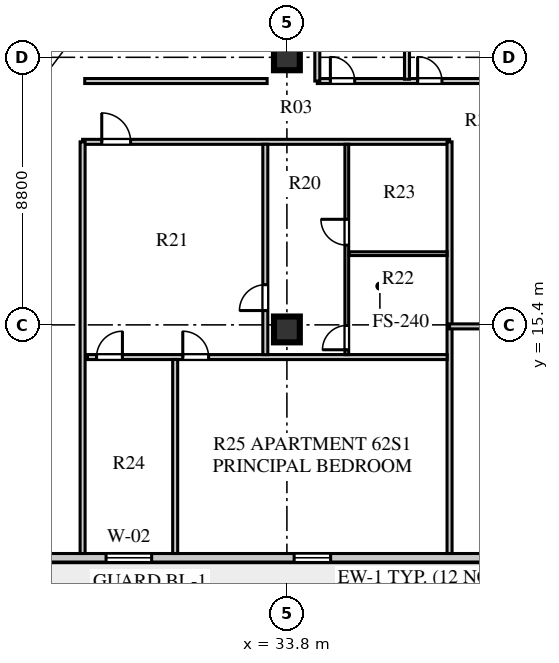
"""IFC4 building model, lengths in metres.
Left out: names, types, materials, properties, quantities, classifications, styles, units other than length and angle.
Written with IfcOpenShell. Run it as: python <this file> out.ifc"""

import sys

from ifc_helpers import new_model, si_unit, direction, frame, frame_2d, origin, origin_2d, place, context, subcontext, project, spatial, rectangle, extrude, element, fill, save


model = new_model("IFC4")
c1 = context("Model", 3, precision=1e-05, world=origin(), true_north=direction((0.0, 1.0)))
c2 = subcontext(c1, "Body", "Model", "MODEL_VIEW")
j1 = project(units=[si_unit("LENGTHUNIT", "METRE"), si_unit("PLANEANGLEUNIT", "RADIAN")], contexts=[c1])
p1 = place(None, origin())
s1 = spatial("IfcSite", under=j1, at=p1, CompositionType="ELEMENT")
p2 = place(p1, origin())
s2 = spatial("IfcBuilding", under=s1, at=p2, CompositionType="ELEMENT")
p3 = place(p2, frame((0.0, 0.0, 253.1)))
s3 = spatial("IfcBuildingStorey", under=s2, at=p3, CompositionType="ELEMENT", Elevation=253.1)
for number, where, z_axis, x_axis in (
    (1, (33.8, 15.25, 0.0), (0.0, 0.0, 1.0), (1.0, 0.0, 0.0)),
    (2, (33.8, 24.2, 0.0), (0.0, 0.0, 1.0), (1.0, 0.0, 0.0)),
):
    element("IfcColumn", number, at=place(p3, frame(where, z_axis=z_axis, x_axis=x_axis)), inside=s3, PredefinedType="COLUMN", context=c2, shape_type="SweptSolid", body=[
        extrude(rectangle(XDim=0.85, YDim=0.85, at=origin_2d()), origin(), (0.0, 0.0, 1.0), 3.66),
    ])
p4 = place(p3, frame((13.05, 7.74, 0.0), z_axis=(0.0, 0.0, 1.0), x_axis=(1.0, 0.0, 0.0)))
e3 = element("IfcWall", 3, at=p4, inside=s3, PredefinedType="STANDARD", context=c2, shape_type="SweptSolid", body=[
    extrude(rectangle(XDim=32.5, YDim=0.28, at=frame_2d((16.25, 0.0))), origin(), (0.0, 0.0, 1.0), 3.66),
])
p5 = place(p4, frame((0.95, 0.0, 0.0)))
e4 = element("IfcOpeningElement", 4, at=p5, cuts=e3, PredefinedType="OPENING", context=c2, shape_type="SweptSolid", body=[
    extrude(rectangle(XDim=1.0, YDim=2.05, at=frame_2d((0.5, 1.025))), frame((0.0, 0.15, 0.0), z_axis=(0.0, -1.0, 0.0), x_axis=(1.0, 0.0, 0.0)), (0.0, 0.0, 1.0), 0.3),
])
p6 = place(p4, frame((2.935, 0.0, 0.8)))
e5 = element("IfcOpeningElement", 5, at=p6, cuts=e3, PredefinedType="OPENING", context=c2, shape_type="SweptSolid", body=[
    extrude(rectangle(XDim=2.25, YDim=2.0, at=frame_2d((1.125, 1.0))), frame((0.0, 0.15, 0.0), z_axis=(0.0, -1.0, 0.0), x_axis=(1.0, 0.0, 0.0)), (0.0, 0.0, 1.0), 0.3),
])
p7 = place(p4, frame((8.295, 0.0, 0.8)))
e6 = element("IfcOpeningElement", 6, at=p7, cuts=e3, PredefinedType="OPENING", context=c2, shape_type="SweptSolid", body=[
    extrude(rectangle(XDim=1.8, YDim=2.0, at=frame_2d((0.9, 1.0))), frame((0.0, 0.15, 0.0), z_axis=(0.0, -1.0, 0.0), x_axis=(1.0, 0.0, 0.0)), (0.0, 0.0, 1.0), 0.3),
])
p8 = place(p4, frame((14.802, 0.0, 0.8)))
e7 = element("IfcOpeningElement", 7, at=p8, cuts=e3, PredefinedType="OPENING", context=c2, shape_type="SweptSolid", body=[
    extrude(rectangle(XDim=1.5, YDim=2.0, at=frame_2d((0.75, 1.0))), frame((0.0, 0.15, 0.0), z_axis=(0.0, -1.0, 0.0), x_axis=(1.0, 0.0, 0.0)), (0.0, 0.0, 1.0), 0.3),
])
p9 = place(p4, frame((20.988, 0.0, 0.8)))
e8 = element("IfcOpeningElement", 8, at=p9, cuts=e3, PredefinedType="OPENING", context=c2, shape_type="SweptSolid", body=[
    extrude(rectangle(XDim=1.2, YDim=1.75, at=frame_2d((0.6, 0.875))), frame((0.0, 0.15, 0.0), z_axis=(0.0, -1.0, 0.0), x_axis=(1.0, 0.0, 0.0)), (0.0, 0.0, 1.0), 0.3),
])
p10 = place(p4, frame((28.045, 0.0, 0.8)))
e9 = element("IfcOpeningElement", 9, at=p10, cuts=e3, PredefinedType="OPENING", context=c2, shape_type="SweptSolid", body=[
    extrude(rectangle(XDim=2.4, YDim=2.05, at=frame_2d((1.2, 1.025))), frame((0.0, 0.15, 0.0), z_axis=(0.0, -1.0, 0.0), x_axis=(1.0, 0.0, 0.0)), (0.0, 0.0, 1.0), 0.3),
])
p11 = place(p3, frame((27.08, 21.42, 0.0), z_axis=(0.0, 0.0, 1.0), x_axis=(1.0, 0.0, 0.0)))
e10 = element("IfcWall", 10, at=p11, inside=s3, PredefinedType="PARTITIONING", context=c2, shape_type="SweptSolid", body=[
    extrude(rectangle(XDim=12.07, YDim=0.165, at=frame_2d((6.035, 0.0))), origin(), (0.0, 0.0, 1.0), 3.31),
])
p12 = place(p11, frame((0.63, 0.0, 0.0)))
e11 = element("IfcOpeningElement", 11, at=p12, cuts=e10, PredefinedType="OPENING", context=c2, shape_type="SweptSolid", body=[
    extrude(rectangle(XDim=0.95, YDim=2.1, at=frame_2d((0.475, 1.05))), frame((0.0, 0.093, 0.0), z_axis=(0.0, -1.0, 0.0), x_axis=(1.0, 0.0, 0.0)), (0.0, 0.0, 1.0), 0.185),
])
p13 = place(p3, frame((27.08, 7.88, 0.0), z_axis=(0.0, 0.0, 1.0), x_axis=(0.0, 1.0, 0.0)))
e12 = element("IfcWall", 12, at=p13, inside=s3, PredefinedType="PARTITIONING", context=c2, shape_type="SweptSolid", body=[
    extrude(rectangle(XDim=13.54, YDim=0.165, at=frame_2d((6.77, 0.0))), origin(), (0.0, 0.0, 1.0), 3.66),
])
p14 = place(p3, frame((27.15, 23.42, 0.0), z_axis=(0.0, 0.0, 1.0), x_axis=(1.0, 0.0, 0.0)))
e13 = element("IfcWall", 13, at=p14, inside=s3, PredefinedType="PARTITIONING", context=c2, shape_type="SweptSolid", body=[
    extrude(rectangle(XDim=6.0, YDim=0.165, at=frame_2d((3.0, 0.0))), origin(), (0.0, 0.0, 1.0), 3.66),
])
p15 = place(p3, frame((39.15, 7.88, 0.0), z_axis=(0.0, 0.0, 1.0), x_axis=(0.0, 1.0, 0.0)))
e14 = element("IfcWall", 14, at=p15, inside=s3, PredefinedType="PARTITIONING", context=c2, shape_type="SweptSolid", body=[
    extrude(rectangle(XDim=13.54, YDim=0.165, at=frame_2d((6.77, 0.0))), origin(), (0.0, 0.0, 1.0), 3.66),
])
p16 = place(p3, frame((27.24, 14.341, 0.0), z_axis=(0.0, 0.0, 1.0), x_axis=(1.0, 0.0, 0.0)))
e15 = element("IfcWall", 15, at=p16, inside=s3, PredefinedType="PARTITIONING", context=c2, shape_type="SweptSolid", body=[
    extrude(rectangle(XDim=11.83, YDim=0.165, at=frame_2d((5.915, 0.0))), origin(), (0.0, 0.0, 1.0), 3.66),
])
p17 = place(p16, frame((0.3, 0.0, 0.0)))
e16 = element("IfcOpeningElement", 16, at=p17, cuts=e15, PredefinedType="OPENING", context=c2, shape_type="SweptSolid", body=[
    extrude(rectangle(XDim=0.85, YDim=2.08, at=frame_2d((0.425, 1.04))), frame((0.0, 0.093, 0.0), z_axis=(0.0, -1.0, 0.0), x_axis=(1.0, 0.0, 0.0)), (0.0, 0.0, 1.0), 0.185),
])
p18 = place(p16, frame((3.135, 0.0, 0.0)))
e17 = element("IfcOpeningElement", 17, at=p18, cuts=e15, PredefinedType="OPENING", context=c2, shape_type="SweptSolid", body=[
    extrude(rectangle(XDim=0.85, YDim=2.08, at=frame_2d((0.425, 1.04))), frame((0.0, 0.093, 0.0), z_axis=(0.0, -1.0, 0.0), x_axis=(1.0, 0.0, 0.0)), (0.0, 0.0, 1.0), 0.185),
])
p19 = place(p3, frame((35.77, 14.421, 0.0), z_axis=(0.0, 0.0, 1.0), x_axis=(0.0, 1.0, 0.0)))
e18 = element("IfcWall", 18, at=p19, inside=s3, PredefinedType="PLUMBINGWALL", context=c2, shape_type="SweptSolid", body=[
    extrude(rectangle(XDim=6.919, YDim=0.125, at=frame_2d((3.459, 0.0))), origin(), (0.0, 0.0, 1.0), 3.66),
])
p20 = place(p19, frame((0.16, 0.0, 0.0)))
e19 = element("IfcOpeningElement", 19, at=p20, cuts=e18, PredefinedType="OPENING", context=c2, shape_type="SweptSolid", body=[
    extrude(rectangle(XDim=0.8, YDim=2.05, at=frame_2d((0.4, 1.025))), frame((0.0, 0.073, 0.0), z_axis=(0.0, -1.0, 0.0), x_axis=(1.0, 0.0, 0.0)), (0.0, 0.0, 1.0), 0.145),
])
p21 = place(p19, frame((3.601, 0.0, 0.0)))
e20 = element("IfcOpeningElement", 20, at=p21, cuts=e18, PredefinedType="OPENING", context=c2, shape_type="SweptSolid", body=[
    extrude(rectangle(XDim=0.85, YDim=2.08, at=frame_2d((0.425, 1.04))), frame((0.0, 0.073, 0.0), z_axis=(0.0, -1.0, 0.0), x_axis=(1.0, 0.0, 0.0)), (0.0, 0.0, 1.0), 0.145),
])
p22 = place(p3, frame((35.85, 17.742, 0.0), z_axis=(0.0, 0.0, 1.0), x_axis=(1.0, 0.0, 0.0)))
e21 = element("IfcWall", 21, at=p22, inside=s3, PredefinedType="PLUMBINGWALL", context=c2, shape_type="SweptSolid", body=[
    extrude(rectangle(XDim=3.22, YDim=0.125, at=frame_2d((1.61, 0.0))), origin(), (0.0, 0.0, 1.0), 3.66),
])
p23 = place(p3, frame((33.09, 14.421, 0.0), z_axis=(0.0, 0.0, 1.0), x_axis=(0.0, 1.0, 0.0)))
e22 = element("IfcWall", 22, at=p23, inside=s3, PredefinedType="PARTITIONING", context=c2, shape_type="SweptSolid", body=[
    extrude(rectangle(XDim=6.919, YDim=0.165, at=frame_2d((3.459, 0.0))), origin(), (0.0, 0.0, 1.0), 3.66),
])
p24 = place(p23, frame((1.45, 0.0, 0.0)))
e23 = element("IfcOpeningElement", 23, at=p24, cuts=e22, PredefinedType="OPENING", context=c2, shape_type="SweptSolid", body=[
    extrude(rectangle(XDim=0.85, YDim=2.08, at=frame_2d((0.425, 1.04))), frame((0.0, 0.093, 0.0), z_axis=(0.0, -1.0, 0.0), x_axis=(1.0, 0.0, 0.0)), (0.0, 0.0, 1.0), 0.185),
])
p25 = place(p3, frame((30.125, 7.88, 0.0), z_axis=(0.0, 0.0, 1.0), x_axis=(0.0, 1.0, 0.0)))
e24 = element("IfcWall", 24, at=p25, inside=s3, PredefinedType="PARTITIONING", context=c2, shape_type="SweptSolid", body=[
    extrude(rectangle(XDim=6.381, YDim=0.165, at=frame_2d((3.19, 0.0))), origin(), (0.0, 0.0, 1.0), 3.66),
])
p26 = place(p3, frame((39.15, 15.35, 0.0), z_axis=(0.0, 0.0, 1.0), x_axis=(1.0, 0.0, 0.0)))
e25 = element("IfcWall", 25, at=p26, inside=s3, PredefinedType="PARTITIONING", context=c2, shape_type="SweptSolid", body=[
    extrude(rectangle(XDim=11.37, YDim=0.165, at=frame_2d((5.685, 0.0))), origin(), (0.0, 0.0, 1.0), 3.06),
])
p27 = place(p3, frame((34.8, 23.42, 0.0), z_axis=(0.0, 0.0, 1.0), x_axis=(1.0, 0.0, 0.0)))
e26 = element("IfcWall", 26, at=p27, inside=s3, PredefinedType="PARTITIONING", context=c2, shape_type="SweptSolid", body=[
    extrude(rectangle(XDim=5.9, YDim=0.165, at=frame_2d((2.95, 0.0))), origin(), (0.0, 0.0, 1.0), 3.66),
])
p28 = place(p27, frame((0.43, 0.0, 0.0)))
e27 = element("IfcOpeningElement", 27, at=p28, cuts=e26, PredefinedType="OPENING", context=c2, shape_type="SweptSolid", body=[
    extrude(rectangle(XDim=0.8, YDim=2.05, at=frame_2d((0.4, 1.025))), frame((0.0, 0.093, 0.0), z_axis=(0.0, -1.0, 0.0), x_axis=(1.0, 0.0, 0.0)), (0.0, 0.0, 1.0), 0.185),
])
p29 = place(p27, frame((3.3, 0.0, 0.0)))
e28 = element("IfcOpeningElement", 28, at=p29, cuts=e26, PredefinedType="OPENING", context=c2, shape_type="SweptSolid", body=[
    extrude(rectangle(XDim=0.8, YDim=2.05, at=frame_2d((0.4, 1.025))), frame((0.0, 0.093, 0.0), z_axis=(0.0, -1.0, 0.0), x_axis=(1.0, 0.0, 0.0)), (0.0, 0.0, 1.0), 0.185),
])
p30 = place(p3, frame((34.8, 23.42, 0.0), z_axis=(0.0, 0.0, 1.0), x_axis=(0.0, 1.0, 0.0)))
e29 = element("IfcWall", 29, at=p30, inside=s3, PredefinedType="PARTITIONING", context=c2, shape_type="SweptSolid", body=[
    extrude(rectangle(XDim=3.78, YDim=0.165, at=frame_2d((1.89, 0.0))), origin(), (0.0, 0.0, 1.0), 3.66),
])
p31 = place(p3, frame((37.75, 23.48, 0.0), z_axis=(0.0, 0.0, 1.0), x_axis=(0.0, 1.0, 0.0)))
e30 = element("IfcWall", 30, at=p31, inside=s3, PredefinedType="PARTITIONING", context=c2, shape_type="SweptSolid", body=[
    extrude(rectangle(XDim=3.66, YDim=0.165, at=frame_2d((1.83, 0.0))), origin(), (0.0, 0.0, 1.0), 3.66),
])
p32 = place(p8, origin())
e31 = element("IfcWindow", 31, at=p32, inside=s3, PartitioningType="SINGLE_PANEL", PredefinedType="WINDOW", context=c2, shape_type="SweptSolid", body=[
    extrude(rectangle(XDim=1.5, YDim=2.0, at=frame_2d((0.75, 1.0))), frame((0.0, 0.03, 0.0), z_axis=(0.0, -1.0, 0.0), x_axis=(1.0, 0.0, 0.0)), (0.0, 0.0, 1.0), 0.06),
])
fill(e7, e31)
p33 = place(p9, origin())
e32 = element("IfcWindow", 32, at=p33, inside=s3, PartitioningType="SINGLE_PANEL", PredefinedType="WINDOW", context=c2, shape_type="SweptSolid", body=[
    extrude(rectangle(XDim=1.2, YDim=1.75, at=frame_2d((0.6, 0.875))), frame((0.0, 0.03, 0.0), z_axis=(0.0, -1.0, 0.0), x_axis=(1.0, 0.0, 0.0)), (0.0, 0.0, 1.0), 0.06),
])
fill(e8, e32)
p34 = place(p24, origin())
e33 = element("IfcDoor", 33, at=p34, inside=s3, OperationType="SINGLE_SWING_LEFT", PredefinedType="DOOR", context=c2, shape_type="SweptSolid", body=[
    extrude(rectangle(XDim=0.85, YDim=2.08, at=frame_2d((0.425, 1.04))), frame((0.0, 0.025, 0.0), z_axis=(0.0, -1.0, 0.0), x_axis=(1.0, 0.0, 0.0)), (0.0, 0.0, 1.0), 0.05),
])
fill(e23, e33)
p35 = place(p20, origin())
e34 = element("IfcDoor", 34, at=p35, inside=s3, OperationType="SINGLE_SWING_LEFT", PredefinedType="DOOR", context=c2, shape_type="SweptSolid", body=[
    extrude(rectangle(XDim=0.8, YDim=2.05, at=frame_2d((0.4, 1.025))), frame((0.0, 0.025, 0.0), z_axis=(0.0, -1.0, 0.0), x_axis=(1.0, 0.0, 0.0)), (0.0, 0.0, 1.0), 0.05),
])
fill(e19, e34)
p36 = place(p21, origin())
e35 = element("IfcDoor", 35, at=p36, inside=s3, OperationType="SINGLE_SWING_RIGHT", PredefinedType="DOOR", context=c2, shape_type="SweptSolid", body=[
    extrude(rectangle(XDim=0.85, YDim=2.08, at=frame_2d((0.425, 1.04))), frame((0.0, 0.025, 0.0), z_axis=(0.0, -1.0, 0.0), x_axis=(1.0, 0.0, 0.0)), (0.0, 0.0, 1.0), 0.05),
])
fill(e20, e35)
p37 = place(p17, frame((0.85, 0.0, 0.0), z_axis=(0.0, 0.0, 1.0), x_axis=(-1.0, 0.0, 0.0)))
e36 = element("IfcDoor", 36, at=p37, inside=s3, OperationType="SINGLE_SWING_LEFT", PredefinedType="DOOR", context=c2, shape_type="SweptSolid", body=[
    extrude(rectangle(XDim=0.85, YDim=2.08, at=frame_2d((0.425, 1.04))), frame((0.0, 0.025, 0.0), z_axis=(0.0, -1.0, 0.0), x_axis=(1.0, 0.0, 0.0)), (0.0, 0.0, 1.0), 0.05),
])
fill(e16, e36)
p38 = place(p18, frame((0.85, 0.0, 0.0), z_axis=(0.0, 0.0, 1.0), x_axis=(-1.0, 0.0, 0.0)))
e37 = element("IfcDoor", 37, at=p38, inside=s3, OperationType="SINGLE_SWING_RIGHT", PredefinedType="DOOR", context=c2, shape_type="SweptSolid", body=[
    extrude(rectangle(XDim=0.85, YDim=2.08, at=frame_2d((0.425, 1.04))), frame((0.0, 0.025, 0.0), z_axis=(0.0, -1.0, 0.0), x_axis=(1.0, 0.0, 0.0)), (0.0, 0.0, 1.0), 0.05),
])
fill(e17, e37)
p39 = place(p12, frame((0.95, 0.0, 0.0), z_axis=(0.0, 0.0, 1.0), x_axis=(-1.0, 0.0, 0.0)))
e38 = element("IfcDoor", 38, at=p39, inside=s3, OperationType="SINGLE_SWING_RIGHT", PredefinedType="DOOR", context=c2, shape_type="SweptSolid", body=[
    extrude(rectangle(XDim=0.95, YDim=2.1, at=frame_2d((0.475, 1.05))), frame((0.0, 0.025, 0.0), z_axis=(0.0, -1.0, 0.0), x_axis=(1.0, 0.0, 0.0)), (0.0, 0.0, 1.0), 0.05),
])
fill(e11, e38)
p40 = place(p28, origin())
e39 = element("IfcDoor", 39, at=p40, inside=s3, OperationType="SINGLE_SWING_LEFT", PredefinedType="DOOR", context=c2, shape_type="SweptSolid", body=[
    extrude(rectangle(XDim=0.8, YDim=2.05, at=frame_2d((0.4, 1.025))), frame((0.0, 0.025, 0.0), z_axis=(0.0, -1.0, 0.0), x_axis=(1.0, 0.0, 0.0)), (0.0, 0.0, 1.0), 0.05),
])
fill(e27, e39)
p41 = place(p29, origin())
e40 = element("IfcDoor", 40, at=p41, inside=s3, OperationType="SINGLE_SWING_LEFT", PredefinedType="DOOR", context=c2, shape_type="SweptSolid", body=[
    extrude(rectangle(XDim=0.8, YDim=2.05, at=frame_2d((0.4, 1.025))), frame((0.0, 0.025, 0.0), z_axis=(0.0, -1.0, 0.0), x_axis=(1.0, 0.0, 0.0)), (0.0, 0.0, 1.0), 0.05),
])
fill(e28, e40)
save(model, sys.argv[1])
